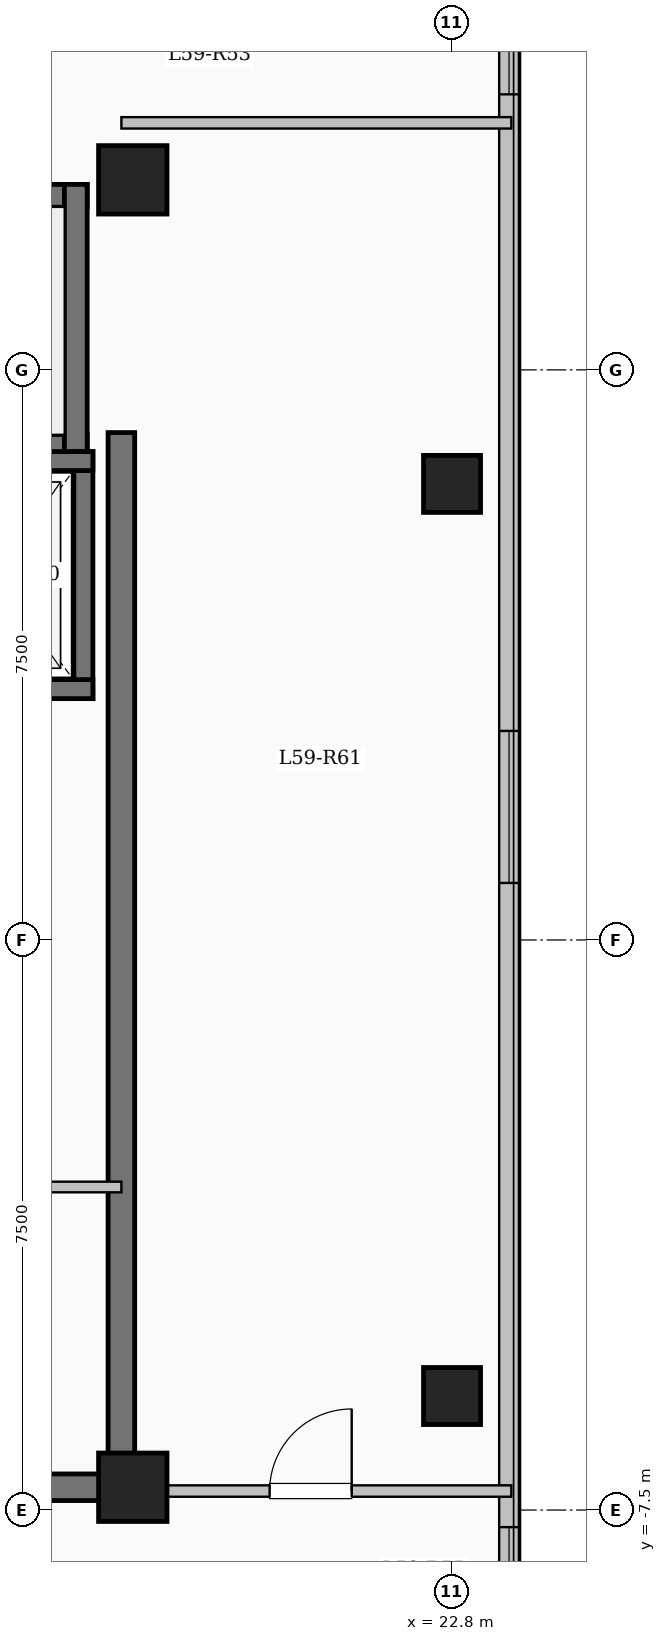
"""IFC4 building model, lengths in metres.
Left out: names, types, materials, properties, quantities, classifications, styles, units other than length and angle.
Written with IfcOpenShell. Run it as: python <this file> out.ifc"""

import sys

from ifc_helpers import new_model, si_unit, direction, frame, frame_2d, origin, origin_2d, place, context, subcontext, project, spatial, rectangle, extrude, element, fill, save


model = new_model("IFC4")
c1 = context("Model", 3, precision=1e-05, world=origin(), true_north=direction((0.0, 1.0)))
c2 = subcontext(c1, "Body", "Model", "MODEL_VIEW")
j1 = project(units=[si_unit("LENGTHUNIT", "METRE"), si_unit("PLANEANGLEUNIT", "RADIAN")], contexts=[c1])
p1 = place(None, origin())
s1 = spatial("IfcSite", under=j1, at=p1, CompositionType="ELEMENT")
p2 = place(p1, origin())
s2 = spatial("IfcBuilding", under=s1, at=p2, CompositionType="ELEMENT")
p3 = place(p2, frame((0.0, 0.0, 217.05)))
s3 = spatial("IfcBuildingStorey", under=s2, at=p3, CompositionType="ELEMENT", Elevation=217.05)
for number, where, z_axis, x_axis in (
    (1, (18.6, -7.2, 0.0), (0.0, 0.0, 1.0), (1.0, 0.0, 0.0)),
    (2, (18.6, 10.0, 0.0), (0.0, 0.0, 1.0), (1.0, 0.0, 0.0)),
):
    element("IfcColumn", number, at=place(p3, frame(where, z_axis=z_axis, x_axis=x_axis)), inside=s3, PredefinedType="COLUMN", context=c2, shape_type="SweptSolid", body=[
        extrude(rectangle(XDim=0.9, YDim=0.9, at=origin_2d()), origin(), (0.0, 0.0, 1.0), 3.35),
    ])
for number, where, z_axis, x_axis in (
    (3, (22.8, -6.0, 0.0), (0.0, 0.0, 1.0), (1.0, 0.0, 0.0)),
    (4, (22.8, 6.0, 0.0), (0.0, 0.0, 1.0), (1.0, 0.0, 0.0)),
):
    element("IfcColumn", number, at=place(p3, frame(where, z_axis=z_axis, x_axis=x_axis)), inside=s3, PredefinedType="COLUMN", context=c2, shape_type="SweptSolid", body=[
        extrude(rectangle(XDim=0.75, YDim=0.75, at=origin_2d()), origin(), (0.0, 0.0, 1.0), 3.35),
    ])
p4 = place(p3, frame((23.55, 17.25, 0.0), z_axis=(0.0, 0.0, 1.0), x_axis=(0.0, -1.0, 0.0)))
e5 = element("IfcWall", 5, at=p4, inside=s3, PredefinedType="SOLIDWALL", context=c2, shape_type="SweptSolid", body=[
    extrude(rectangle(XDim=34.5, YDim=0.26, at=frame_2d((17.25, 0.0))), origin(), (0.0, 0.0, 1.0), 3.1),
])
p5 = place(p4, frame((1.375, 0.0, 0.9)))
e6 = element("IfcOpeningElement", 6, at=p5, cuts=e5, PredefinedType="OPENING", context=c2, shape_type="SweptSolid", body=[
    extrude(rectangle(XDim=2.0, YDim=1.7, at=frame_2d((1.0, 0.85))), frame((0.0, 0.14, 0.0), z_axis=(0.0, -1.0, 0.0), x_axis=(1.0, 0.0, 0.0)), (0.0, 0.0, 1.0), 0.28),
])
p6 = place(p4, frame((5.125, 0.0, 0.95)))
e7 = element("IfcOpeningElement", 7, at=p6, cuts=e5, PredefinedType="OPENING", context=c2, shape_type="SweptSolid", body=[
    extrude(rectangle(XDim=1.0, YDim=1.5, at=frame_2d((0.5, 0.75))), frame((0.0, 0.14, 0.0), z_axis=(0.0, -1.0, 0.0), x_axis=(1.0, 0.0, 0.0)), (0.0, 0.0, 1.0), 0.28),
])
p7 = place(p4, frame((14.5, 0.0, 0.9)))
e8 = element("IfcOpeningElement", 8, at=p7, cuts=e5, PredefinedType="OPENING", context=c2, shape_type="SweptSolid", body=[
    extrude(rectangle(XDim=2.0, YDim=1.7, at=frame_2d((1.0, 0.85))), frame((0.0, 0.14, 0.0), z_axis=(0.0, -1.0, 0.0), x_axis=(1.0, 0.0, 0.0)), (0.0, 0.0, 1.0), 0.28),
])
p8 = place(p4, frame((24.975, 0.0, 0.95)))
e9 = element("IfcOpeningElement", 9, at=p8, cuts=e5, PredefinedType="OPENING", context=c2, shape_type="SweptSolid", body=[
    extrude(rectangle(XDim=1.2, YDim=1.5, at=frame_2d((0.6, 0.75))), frame((0.0, 0.14, 0.0), z_axis=(0.0, -1.0, 0.0), x_axis=(1.0, 0.0, 0.0)), (0.0, 0.0, 1.0), 0.28),
])
p9 = place(p4, frame((29.475, 0.0, 0.9)))
e10 = element("IfcOpeningElement", 10, at=p9, cuts=e5, PredefinedType="OPENING", context=c2, shape_type="SweptSolid", body=[
    extrude(rectangle(XDim=2.2, YDim=1.75, at=frame_2d((1.1, 0.875))), frame((0.0, 0.14, 0.0), z_axis=(0.0, -1.0, 0.0), x_axis=(1.0, 0.0, 0.0)), (0.0, 0.0, 1.0), 0.28),
])
p10 = place(p3, frame((10.0, 9.79, 0.0), z_axis=(0.0, 0.0, 1.0), x_axis=(1.0, 0.0, 0.0)))
e11 = element("IfcWall", 11, at=p10, inside=s3, PredefinedType="SHEAR", context=c2, shape_type="SweptSolid", body=[
    extrude(rectangle(XDim=8.0, YDim=0.3, at=frame_2d((4.0, 0.0))), origin(), (0.0, 0.0, 1.0), 3.35),
])
p11 = place(p3, frame((10.0, 6.5, 0.0), z_axis=(0.0, 0.0, 1.0), x_axis=(1.0, 0.0, 0.0)))
e12 = element("IfcWall", 12, at=p11, inside=s3, PredefinedType="SHEAR", context=c2, shape_type="SweptSolid", body=[
    extrude(rectangle(XDim=8.0, YDim=0.3, at=frame_2d((4.0, 0.0))), origin(), (0.0, 0.0, 1.0), 3.35),
])
p12 = place(p11, frame((0.55, 0.0, 0.0)))
e13 = element("IfcOpeningElement", 13, at=p12, cuts=e12, PredefinedType="OPENING", context=c2, shape_type="SweptSolid", body=[
    extrude(rectangle(XDim=1.0, YDim=2.15, at=frame_2d((0.5, 1.075))), frame((0.0, 0.16, 0.0), z_axis=(0.0, -1.0, 0.0), x_axis=(1.0, 0.0, 0.0)), (0.0, 0.0, 1.0), 0.32),
])
p13 = place(p3, frame((17.85, 6.35, 0.0), z_axis=(0.0, 0.0, 1.0), x_axis=(0.0, 1.0, 0.0)))
e14 = element("IfcWall", 14, at=p13, inside=s3, PredefinedType="SHEAR", context=c2, shape_type="SweptSolid", body=[
    extrude(rectangle(XDim=3.59, YDim=0.3, at=frame_2d((1.795, 0.0))), origin(), (0.0, 0.0, 1.0), 3.35),
])
p14 = place(p3, frame((17.95, 3.175, 0.0), z_axis=(0.0, 0.0, 1.0), x_axis=(0.0, 1.0, 0.0)))
e15 = element("IfcWall", 15, at=p14, inside=s3, PredefinedType="SHEAR", context=c2, shape_type="SweptSolid", body=[
    extrude(rectangle(XDim=3.25, YDim=0.25, at=frame_2d((1.625, 0.0))), origin(), (0.0, 0.0, 1.0), 3.35),
])
for number, where, z_axis, x_axis in (
    (16, (15.525, 3.3, 0.0), (0.0, 0.0, 1.0), (1.0, 0.0, 0.0)),
    (17, (15.525, 6.3, 0.0), (0.0, 0.0, 1.0), (1.0, 0.0, 0.0)),
):
    element("IfcWall", number, at=place(p3, frame(where, z_axis=z_axis, x_axis=x_axis)), inside=s3, PredefinedType="SHEAR", context=c2, shape_type="SweptSolid", body=[
        extrude(rectangle(XDim=2.55, YDim=0.25, at=frame_2d((1.275, 0.0))), origin(), (0.0, 0.0, 1.0), 3.35),
    ])
p15 = place(p3, frame((18.45, -7.375, 0.0), z_axis=(0.0, 0.0, 1.0), x_axis=(0.0, 1.0, 0.0)))
e18 = element("IfcWall", 18, at=p15, inside=s3, PredefinedType="SHEAR", context=c2, shape_type="SweptSolid", body=[
    extrude(rectangle(XDim=14.05, YDim=0.35, at=frame_2d((7.025, 0.0))), origin(), (0.0, 0.0, 1.0), 3.35),
])
p16 = place(p3, frame((12.625, -7.2, 0.0), z_axis=(0.0, 0.0, 1.0), x_axis=(1.0, 0.0, 0.0)))
e19 = element("IfcWall", 19, at=p16, inside=s3, PredefinedType="SHEAR", context=c2, shape_type="SweptSolid", body=[
    extrude(rectangle(XDim=6.0, YDim=0.35, at=frame_2d((3.0, 0.0))), origin(), (0.0, 0.0, 1.0), 3.35),
])
p17 = place(p3, frame((15.4, -3.25, 0.0), z_axis=(0.0, 0.0, 1.0), x_axis=(1.0, 0.0, 0.0)))
e20 = element("IfcWall", 20, at=p17, inside=s3, PredefinedType="PARTITIONING", context=c2, shape_type="SweptSolid", body=[
    extrude(rectangle(XDim=3.05, YDim=0.14, at=frame_2d((1.525, 0.0))), origin(), (0.0, 0.0, 1.0), 3.1),
])
p18 = place(p17, frame((1.05, 0.0, 0.0)))
e21 = element("IfcOpeningElement", 21, at=p18, cuts=e20, PredefinedType="OPENING", context=c2, shape_type="SweptSolid", body=[
    extrude(rectangle(XDim=0.9, YDim=2.08, at=frame_2d((0.45, 1.04))), frame((0.0, 0.08, 0.0), z_axis=(0.0, -1.0, 0.0), x_axis=(1.0, 0.0, 0.0)), (0.0, 0.0, 1.0), 0.16),
])
p19 = place(p3, frame((18.45, -7.25, 0.0), z_axis=(0.0, 0.0, 1.0), x_axis=(1.0, 0.0, 0.0)))
e22 = element("IfcWall", 22, at=p19, inside=s3, PredefinedType="PARTITIONING", context=c2, shape_type="SweptSolid", body=[
    extrude(rectangle(XDim=5.13, YDim=0.15, at=frame_2d((2.565, 0.0))), origin(), (0.0, 0.0, 1.0), 3.1),
])
p20 = place(p19, frame((1.95, 0.0, 0.0)))
e23 = element("IfcOpeningElement", 23, at=p20, cuts=e22, PredefinedType="OPENING", context=c2, shape_type="SweptSolid", body=[
    extrude(rectangle(XDim=1.08, YDim=2.15, at=frame_2d((0.54, 1.075))), frame((0.0, 0.085, 0.0), z_axis=(0.0, -1.0, 0.0), x_axis=(1.0, 0.0, 0.0)), (0.0, 0.0, 1.0), 0.17),
])
p21 = place(p3, frame((18.45, 10.75, 0.0), z_axis=(0.0, 0.0, 1.0), x_axis=(1.0, 0.0, 0.0)))
e24 = element("IfcWall", 24, at=p21, inside=s3, PredefinedType="PARTITIONING", context=c2, shape_type="SweptSolid", body=[
    extrude(rectangle(XDim=5.13, YDim=0.15, at=frame_2d((2.565, 0.0))), origin(), (0.0, 0.0, 1.0), 3.1),
])
p22 = place(p6, origin())
e25 = element("IfcWindow", 25, at=p22, inside=s3, PartitioningType="SINGLE_PANEL", PredefinedType="WINDOW", context=c2, shape_type="SweptSolid", body=[
    extrude(rectangle(XDim=1.0, YDim=1.5, at=frame_2d((0.5, 0.75))), frame((0.0, 0.03, 0.0), z_axis=(0.0, -1.0, 0.0), x_axis=(1.0, 0.0, 0.0)), (0.0, 0.0, 1.0), 0.06),
])
fill(e7, e25)
p23 = place(p7, origin())
e26 = element("IfcWindow", 26, at=p23, inside=s3, PartitioningType="SINGLE_PANEL", PredefinedType="WINDOW", context=c2, shape_type="SweptSolid", body=[
    extrude(rectangle(XDim=2.0, YDim=1.7, at=frame_2d((1.0, 0.85))), frame((0.0, 0.03, 0.0), z_axis=(0.0, -1.0, 0.0), x_axis=(1.0, 0.0, 0.0)), (0.0, 0.0, 1.0), 0.06),
])
fill(e8, e26)
p24 = place(p8, origin())
e27 = element("IfcWindow", 27, at=p24, inside=s3, PartitioningType="SINGLE_PANEL", PredefinedType="WINDOW", context=c2, shape_type="SweptSolid", body=[
    extrude(rectangle(XDim=1.2, YDim=1.5, at=frame_2d((0.6, 0.75))), frame((0.0, 0.03, 0.0), z_axis=(0.0, -1.0, 0.0), x_axis=(1.0, 0.0, 0.0)), (0.0, 0.0, 1.0), 0.06),
])
fill(e9, e27)
p25 = place(p20, origin())
e28 = element("IfcDoor", 28, at=p25, inside=s3, OperationType="SINGLE_SWING_RIGHT", PredefinedType="DOOR", context=c2, shape_type="SweptSolid", body=[
    extrude(rectangle(XDim=1.08, YDim=2.15, at=frame_2d((0.54, 1.075))), frame((0.0, 0.025, 0.0), z_axis=(0.0, -1.0, 0.0), x_axis=(1.0, 0.0, 0.0)), (0.0, 0.0, 1.0), 0.05),
])
fill(e23, e28)
save(model, sys.argv[1])
